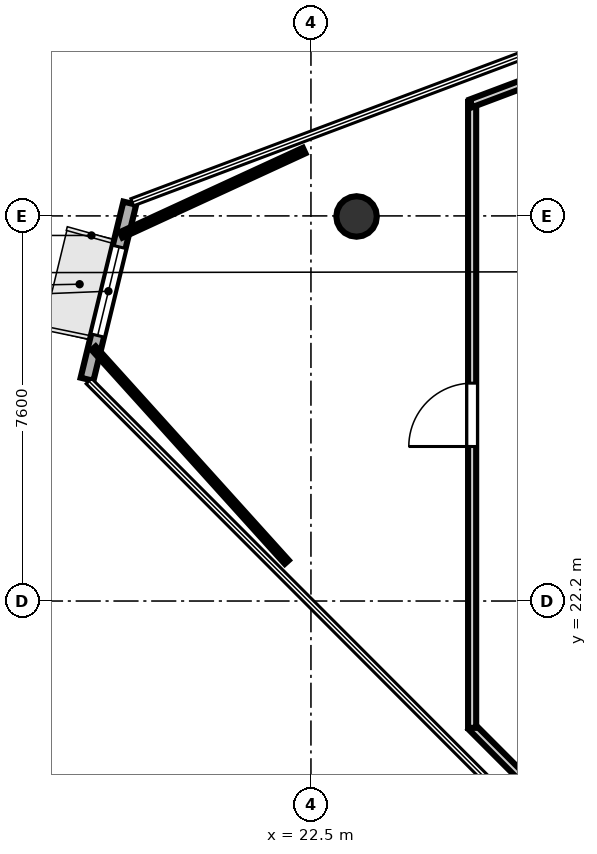
"""IFC4 building model, lengths in metres.
Left out: names, types, materials, properties, quantities, classifications, styles, units other than length and angle.
Written with IfcOpenShell. Run it as: python <this file> out.ifc"""

import sys

from ifc_helpers import new_model, si_unit, direction, frame, frame_2d, origin, origin_2d, place, context, subcontext, project, spatial, rectangle, hollow_circle, extrude, element, fill, save


model = new_model("IFC4")
c1 = context("Model", 3, precision=1e-05, world=origin(), true_north=direction((0.0, 1.0)))
c2 = subcontext(c1, "Body", "Model", "MODEL_VIEW")
j1 = project(units=[si_unit("LENGTHUNIT", "METRE"), si_unit("PLANEANGLEUNIT", "RADIAN")], contexts=[c1])
p1 = place(None, origin())
s1 = spatial("IfcSite", under=j1, at=p1, CompositionType="ELEMENT")
p2 = place(p1, origin())
s2 = spatial("IfcBuilding", under=s1, at=p2, CompositionType="ELEMENT")
p3 = place(p2, frame((0.0, 0.0, 340.7)))
s3 = spatial("IfcBuildingStorey", under=s2, at=p3, CompositionType="ELEMENT", Elevation=340.7)
p4 = place(p3, frame((23.4, 29.789, 0.0), z_axis=(0.0, 0.0, 1.0), x_axis=(1.0, 0.0, 0.0)))
e1 = element("IfcColumn", 1, at=p4, inside=s3, PredefinedType="COLUMN", context=c2, shape_type="SweptSolid", body=[
    extrude(hollow_circle(Radius=0.4, WallThickness=0.022, at=origin_2d()), origin(), (0.0, 0.0, 1.0), 3.7),
])
p5 = place(p3, frame((18.925, 30.052, 0.0), z_axis=(0.0, 0.0, 1.0), x_axis=(-0.236057185344, -0.971739165233, 0.0)))
e2 = element("IfcWall", 2, at=p5, inside=s3, PredefinedType="SOLIDWALL", context=c2, shape_type="SweptSolid", body=[
    extrude(rectangle(XDim=3.576, YDim=0.26, at=frame_2d((1.788, 0.0))), origin(), (0.0, 0.0, 1.0), 3.52),
])
p6 = place(p5, frame((0.888, 0.0, 0.85)))
e3 = element("IfcOpeningElement", 3, at=p6, cuts=e2, PredefinedType="OPENING", context=c2, shape_type="SweptSolid", body=[
    extrude(rectangle(XDim=1.8, YDim=2.1, at=frame_2d((0.9, 1.05))), frame((0.0, 0.14, 0.0), z_axis=(0.0, -1.0, 0.0), x_axis=(1.0, 0.0, 0.0)), (0.0, 0.0, 1.0), 0.28),
])
p7 = place(p3, frame((27.067, 18.322, 0.0), z_axis=(0.0, 0.0, 1.0), x_axis=(-0.706612041623, 0.707601174839, 0.0)))
e4 = element("IfcWall", 4, at=p7, inside=s3, PredefinedType="PARTITIONING", context=c2, shape_type="SweptSolid", body=[
    extrude(rectangle(XDim=1.975, YDim=0.16, at=frame_2d((0.987, 0.0))), origin(), (0.0, 0.0, 1.0), 2.84),
])
p8 = place(p3, frame((25.681, 19.697, 0.0), z_axis=(0.0, 0.0, 1.0), x_axis=(0.0, 1.0, 0.0)))
e5 = element("IfcWall", 5, at=p8, inside=s3, PredefinedType="PARTITIONING", context=c2, shape_type="SweptSolid", body=[
    extrude(rectangle(XDim=12.354, YDim=0.16, at=frame_2d((6.177, 0.0))), origin(), (0.0, 0.0, 1.0), 2.84),
])
p9 = place(p8, frame((5.552, 0.0, 0.0)))
e6 = element("IfcOpeningElement", 6, at=p9, cuts=e5, PredefinedType="OPENING", context=c2, shape_type="SweptSolid", body=[
    extrude(rectangle(XDim=1.25, YDim=2.2, at=frame_2d((0.625, 1.1))), frame((0.0, 0.09, 0.0), z_axis=(0.0, -1.0, 0.0), x_axis=(1.0, 0.0, 0.0)), (0.0, 0.0, 1.0), 0.18),
])
p10 = place(p3, frame((25.661, 32.022, 0.0), z_axis=(0.0, 0.0, 1.0), x_axis=(0.936018944995, 0.351949619422, 0.0)))
e7 = element("IfcWall", 7, at=p10, inside=s3, PredefinedType="PARTITIONING", context=c2, shape_type="SweptSolid", body=[
    extrude(rectangle(XDim=2.105, YDim=0.16, at=frame_2d((1.052, 0.0))), origin(), (0.0, 0.0, 1.0), 2.84),
])
p11 = place(p3, frame((22.022, 22.969, 0.0), z_axis=(0.0, 0.0, 1.0), x_axis=(-0.670140549565, 0.742234224372, 0.0)))
e8 = element("IfcWall", 8, at=p11, inside=s3, PredefinedType="PARTITIONING", context=c2, shape_type="SweptSolid", body=[
    extrude(rectangle(XDim=5.686, YDim=0.105, at=frame_2d((2.843, 0.0))), origin(), (0.0, 0.0, 1.0), 2.84),
])
p12 = place(p3, frame((18.756, 29.426, 0.0), z_axis=(0.0, 0.0, 1.0), x_axis=(0.908270168389, 0.418384155072, 0.0)))
e9 = element("IfcWall", 9, at=p12, inside=s3, PredefinedType="PARTITIONING", context=c2, shape_type="SweptSolid", body=[
    extrude(rectangle(XDim=3.974, YDim=0.12, at=frame_2d((1.987, 0.0))), origin(), (0.0, 0.0, 1.0), 2.84),
])
p13 = place(p9, origin())
e10 = element("IfcDoor", 10, at=p13, inside=s3, OperationType="SINGLE_SWING_LEFT", PredefinedType="DOOR", context=c2, shape_type="SweptSolid", body=[
    extrude(rectangle(XDim=1.25, YDim=2.2, at=frame_2d((0.625, 1.1))), frame((0.0, 0.025, 0.0), z_axis=(0.0, -1.0, 0.0), x_axis=(1.0, 0.0, 0.0)), (0.0, 0.0, 1.0), 0.05),
])
fill(e6, e10)
p14 = place(p6, origin())
e11 = element("IfcWindow", 11, at=p14, inside=s3, PartitioningType="SINGLE_PANEL", PredefinedType="WINDOW", context=c2, shape_type="SweptSolid", body=[
    extrude(rectangle(XDim=1.8, YDim=2.1, at=frame_2d((0.9, 1.05))), frame((0.0, 0.03, 0.0), z_axis=(0.0, -1.0, 0.0), x_axis=(1.0, 0.0, 0.0)), (0.0, 0.0, 1.0), 0.06),
])
fill(e3, e11)
save(model, sys.argv[1])
